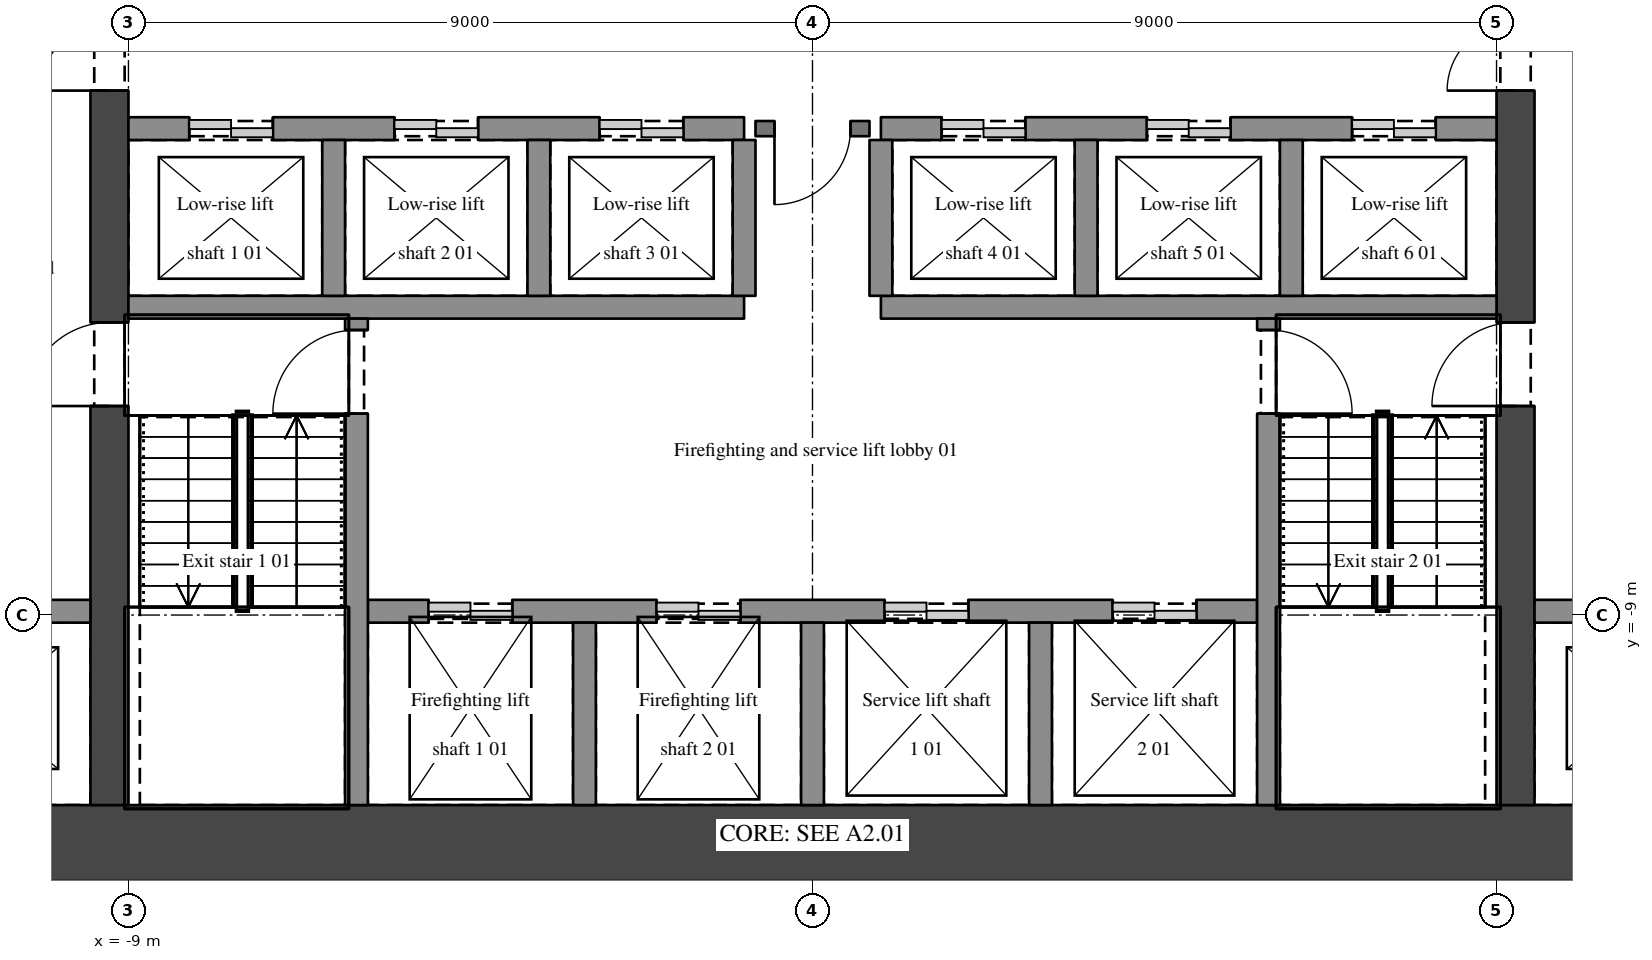
"""IFC4 building model, lengths in metres.
Left out: names, types, materials, properties, quantities, classifications, styles, units other than length and angle.
Written with IfcOpenShell. Run it as: python <this file> out.ifc"""

import sys

from ifc_helpers import new_model, si_unit, direction, frame, frame_2d, origin, place, context, subcontext, project, spatial, rectangle, extrude, element, fill, save


model = new_model("IFC4")
c1 = context("Model", 3, precision=1e-05, world=origin(), true_north=direction((0.0, 1.0)))
c2 = subcontext(c1, "Body", "Model", "MODEL_VIEW")
j1 = project(units=[si_unit("LENGTHUNIT", "METRE"), si_unit("PLANEANGLEUNIT", "RADIAN")], contexts=[c1])
p1 = place(None, origin())
s1 = spatial("IfcSite", under=j1, at=p1, CompositionType="ELEMENT")
p2 = place(p1, origin())
s2 = spatial("IfcBuilding", under=s1, at=p2, CompositionType="ELEMENT")
p3 = place(p2, origin())
s3 = spatial("IfcBuildingStorey", under=s2, at=p3, CompositionType="ELEMENT", Elevation=0.0)
p4 = place(p3, frame((-15.0, -12.0, 0.0), z_axis=(0.0, 0.0, 1.0), x_axis=(1.0, 0.0, 0.0)))
e1 = element("IfcWall", 1, at=p4, inside=s3, PredefinedType="SHEAR", context=c2, shape_type="SweptSolid", body=[
    extrude(rectangle(XDim=30.0, YDim=1.0, at=frame_2d((15.0, 0.0))), origin(), (0.0, 0.0, 1.0), 10.8),
])
p5 = place(p3, frame((-9.25, -11.5, 0.0), z_axis=(0.0, 0.0, 1.0), x_axis=(0.0, 1.0, 0.0)))
e2 = element("IfcWall", 2, at=p5, inside=s3, PredefinedType="SHEAR", context=c2, shape_type="SweptSolid", body=[
    extrude(rectangle(XDim=11.65, YDim=0.5, at=frame_2d((5.825, 0.0))), origin(), (0.0, 0.0, 1.0), 10.8),
])
p6 = place(p5, frame((9.4, 0.0, 0.0)))
e3 = element("IfcOpeningElement", 3, at=p6, cuts=e2, PredefinedType="OPENING", context=c2, shape_type="SweptSolid", body=[
    extrude(rectangle(XDim=1.8, YDim=2.1, at=frame_2d((0.9, 1.05))), frame((0.0, 0.26, 0.0), z_axis=(0.0, -1.0, 0.0), x_axis=(1.0, 0.0, 0.0)), (0.0, 0.0, 1.0), 0.52),
])
p7 = place(p5, frame((5.25, 0.0, 0.0)))
e4 = element("IfcOpeningElement", 4, at=p7, cuts=e2, PredefinedType="OPENING", context=c2, shape_type="SweptSolid", body=[
    extrude(rectangle(XDim=1.1, YDim=2.1, at=frame_2d((0.55, 1.05))), frame((0.0, 0.26, 0.0), z_axis=(0.0, -1.0, 0.0), x_axis=(1.0, 0.0, 0.0)), (0.0, 0.0, 1.0), 0.52),
])
p8 = place(p3, frame((9.25, -11.5, 0.0), z_axis=(0.0, 0.0, 1.0), x_axis=(0.0, 1.0, 0.0)))
e5 = element("IfcWall", 5, at=p8, inside=s3, PredefinedType="SHEAR", context=c2, shape_type="SweptSolid", body=[
    extrude(rectangle(XDim=11.65, YDim=0.5, at=frame_2d((5.825, 0.0))), origin(), (0.0, 0.0, 1.0), 10.8),
])
p9 = place(p8, frame((9.4, 0.0, 0.0)))
e6 = element("IfcOpeningElement", 6, at=p9, cuts=e5, PredefinedType="OPENING", context=c2, shape_type="SweptSolid", body=[
    extrude(rectangle(XDim=1.8, YDim=2.1, at=frame_2d((0.9, 1.05))), frame((0.0, 0.26, 0.0), z_axis=(0.0, -1.0, 0.0), x_axis=(1.0, 0.0, 0.0)), (0.0, 0.0, 1.0), 0.52),
])
p10 = place(p8, frame((5.25, 0.0, 0.0)))
e7 = element("IfcOpeningElement", 7, at=p10, cuts=e5, PredefinedType="OPENING", context=c2, shape_type="SweptSolid", body=[
    extrude(rectangle(XDim=1.1, YDim=2.1, at=frame_2d((0.55, 1.05))), frame((0.0, 0.26, 0.0), z_axis=(0.0, -1.0, 0.0), x_axis=(1.0, 0.0, 0.0)), (0.0, 0.0, 1.0), 0.52),
])
p11 = place(p3, frame((-12.25, -8.95, 0.0), z_axis=(0.0, 0.0, 1.0), x_axis=(1.0, 0.0, 0.0)))
e8 = element("IfcWall", 8, at=p11, inside=s3, PredefinedType="SHEAR", context=c2, shape_type="SweptSolid", body=[
    extrude(rectangle(XDim=2.75, YDim=0.3, at=frame_2d((1.375, 0.0))), origin(), (0.0, 0.0, 1.0), 10.8),
])
p12 = place(p11, frame((0.825, 0.0, 0.0)))
e9 = element("IfcOpeningElement", 9, at=p12, cuts=e8, PredefinedType="OPENING", context=c2, shape_type="SweptSolid", body=[
    extrude(rectangle(XDim=1.1, YDim=2.1, at=frame_2d((0.55, 1.05))), frame((0.0, 0.16, 0.0), z_axis=(0.0, -1.0, 0.0), x_axis=(1.0, 0.0, 0.0)), (0.0, 0.0, 1.0), 0.32),
])
p13 = place(p3, frame((-5.85, -8.95, 0.0), z_axis=(0.0, 0.0, 1.0), x_axis=(1.0, 0.0, 0.0)))
e10 = element("IfcWall", 10, at=p13, inside=s3, PredefinedType="SHEAR", context=c2, shape_type="SweptSolid", body=[
    extrude(rectangle(XDim=11.7, YDim=0.3, at=frame_2d((5.85, 0.0))), origin(), (0.0, 0.0, 1.0), 10.8),
])
p14 = place(p13, frame((0.8, 0.0, 0.0)))
e11 = element("IfcOpeningElement", 11, at=p14, cuts=e10, PredefinedType="OPENING", context=c2, shape_type="SweptSolid", body=[
    extrude(rectangle(XDim=1.1, YDim=2.1, at=frame_2d((0.55, 1.05))), frame((0.0, 0.16, 0.0), z_axis=(0.0, -1.0, 0.0), x_axis=(1.0, 0.0, 0.0)), (0.0, 0.0, 1.0), 0.32),
])
p15 = place(p13, frame((3.8, 0.0, 0.0)))
e12 = element("IfcOpeningElement", 12, at=p15, cuts=e10, PredefinedType="OPENING", context=c2, shape_type="SweptSolid", body=[
    extrude(rectangle(XDim=1.1, YDim=2.1, at=frame_2d((0.55, 1.05))), frame((0.0, 0.16, 0.0), z_axis=(0.0, -1.0, 0.0), x_axis=(1.0, 0.0, 0.0)), (0.0, 0.0, 1.0), 0.32),
])
p16 = place(p13, frame((6.8, 0.0, 0.0)))
e13 = element("IfcOpeningElement", 13, at=p16, cuts=e10, PredefinedType="OPENING", context=c2, shape_type="SweptSolid", body=[
    extrude(rectangle(XDim=1.1, YDim=2.1, at=frame_2d((0.55, 1.05))), frame((0.0, 0.16, 0.0), z_axis=(0.0, -1.0, 0.0), x_axis=(1.0, 0.0, 0.0)), (0.0, 0.0, 1.0), 0.32),
])
p17 = place(p13, frame((9.8, 0.0, 0.0)))
e14 = element("IfcOpeningElement", 14, at=p17, cuts=e10, PredefinedType="OPENING", context=c2, shape_type="SweptSolid", body=[
    extrude(rectangle(XDim=1.1, YDim=2.1, at=frame_2d((0.55, 1.05))), frame((0.0, 0.16, 0.0), z_axis=(0.0, -1.0, 0.0), x_axis=(1.0, 0.0, 0.0)), (0.0, 0.0, 1.0), 0.32),
])
p18 = place(p3, frame((9.5, -8.95, 0.0), z_axis=(0.0, 0.0, 1.0), x_axis=(1.0, 0.0, 0.0)))
e15 = element("IfcWall", 15, at=p18, inside=s3, PredefinedType="SHEAR", context=c2, shape_type="SweptSolid", body=[
    extrude(rectangle(XDim=2.75, YDim=0.3, at=frame_2d((1.375, 0.0))), origin(), (0.0, 0.0, 1.0), 10.8),
])
p19 = place(p18, frame((0.825, 0.0, 0.0)))
e16 = element("IfcOpeningElement", 16, at=p19, cuts=e15, PredefinedType="OPENING", context=c2, shape_type="SweptSolid", body=[
    extrude(rectangle(XDim=1.1, YDim=2.1, at=frame_2d((0.55, 1.05))), frame((0.0, 0.16, 0.0), z_axis=(0.0, -1.0, 0.0), x_axis=(1.0, 0.0, 0.0)), (0.0, 0.0, 1.0), 0.32),
])
for number, where, z_axis, x_axis in (
    (17, (-9.0, -4.95, 0.0), (0.0, 0.0, 1.0), (1.0, 0.0, 0.0)),
    (18, (0.9, -4.95, 0.0), (0.0, 0.0, 1.0), (1.0, 0.0, 0.0)),
):
    element("IfcWall", number, at=place(p3, frame(where, z_axis=z_axis, x_axis=x_axis)), inside=s3, PredefinedType="SHEAR", context=c2, shape_type="SweptSolid", body=[
        extrude(rectangle(XDim=8.1, YDim=0.3, at=frame_2d((4.05, 0.0))), origin(), (0.0, 0.0, 1.0), 10.8),
    ])
p20 = place(p3, frame((-9.0, -2.6, 0.0), z_axis=(0.0, 0.0, 1.0), x_axis=(1.0, 0.0, 0.0)))
e19 = element("IfcWall", 19, at=p20, inside=s3, PredefinedType="SHEAR", context=c2, shape_type="SweptSolid", body=[
    extrude(rectangle(XDim=8.1, YDim=0.3, at=frame_2d((4.05, 0.0))), origin(), (0.0, 0.0, 1.0), 10.8),
])
p21 = place(p20, frame((0.8, 0.0, 0.0)))
e20 = element("IfcOpeningElement", 20, at=p21, cuts=e19, PredefinedType="OPENING", context=c2, shape_type="SweptSolid", body=[
    extrude(rectangle(XDim=1.1, YDim=2.1, at=frame_2d((0.55, 1.05))), frame((0.0, 0.16, 0.0), z_axis=(0.0, -1.0, 0.0), x_axis=(1.0, 0.0, 0.0)), (0.0, 0.0, 1.0), 0.32),
])
p22 = place(p20, frame((3.5, 0.0, 0.0)))
e21 = element("IfcOpeningElement", 21, at=p22, cuts=e19, PredefinedType="OPENING", context=c2, shape_type="SweptSolid", body=[
    extrude(rectangle(XDim=1.1, YDim=2.1, at=frame_2d((0.55, 1.05))), frame((0.0, 0.16, 0.0), z_axis=(0.0, -1.0, 0.0), x_axis=(1.0, 0.0, 0.0)), (0.0, 0.0, 1.0), 0.32),
])
p23 = place(p20, frame((6.2, 0.0, 0.0)))
e22 = element("IfcOpeningElement", 22, at=p23, cuts=e19, PredefinedType="OPENING", context=c2, shape_type="SweptSolid", body=[
    extrude(rectangle(XDim=1.1, YDim=2.1, at=frame_2d((0.55, 1.05))), frame((0.0, 0.16, 0.0), z_axis=(0.0, -1.0, 0.0), x_axis=(1.0, 0.0, 0.0)), (0.0, 0.0, 1.0), 0.32),
])
p24 = place(p3, frame((0.75, -2.6, 0.0), z_axis=(0.0, 0.0, 1.0), x_axis=(-1.0, 0.0, 0.0)))
e23 = element("IfcWall", 23, at=p24, inside=s3, PredefinedType="SOLIDWALL", context=c2, shape_type="SweptSolid", body=[
    extrude(rectangle(XDim=1.5, YDim=0.2, at=frame_2d((0.75, 0.0))), origin(), (0.0, 0.0, 1.0), 10.5),
])
p25 = place(p24, frame((0.25, 0.0, 0.0)))
e24 = element("IfcOpeningElement", 24, at=p25, cuts=e23, PredefinedType="OPENING", context=c2, shape_type="SweptSolid", body=[
    extrude(rectangle(XDim=1.0, YDim=2.1, at=frame_2d((0.5, 1.05))), frame((0.0, 0.11, 0.0), z_axis=(0.0, -1.0, 0.0), x_axis=(1.0, 0.0, 0.0)), (0.0, 0.0, 1.0), 0.22),
])
p26 = place(p3, frame((0.9, -2.6, 0.0), z_axis=(0.0, 0.0, 1.0), x_axis=(1.0, 0.0, 0.0)))
e25 = element("IfcWall", 25, at=p26, inside=s3, PredefinedType="SHEAR", context=c2, shape_type="SweptSolid", body=[
    extrude(rectangle(XDim=8.1, YDim=0.3, at=frame_2d((4.05, 0.0))), origin(), (0.0, 0.0, 1.0), 10.8),
])
p27 = place(p26, frame((0.8, 0.0, 0.0)))
e26 = element("IfcOpeningElement", 26, at=p27, cuts=e25, PredefinedType="OPENING", context=c2, shape_type="SweptSolid", body=[
    extrude(rectangle(XDim=1.1, YDim=2.1, at=frame_2d((0.55, 1.05))), frame((0.0, 0.16, 0.0), z_axis=(0.0, -1.0, 0.0), x_axis=(1.0, 0.0, 0.0)), (0.0, 0.0, 1.0), 0.32),
])
p28 = place(p26, frame((3.5, 0.0, 0.0)))
e27 = element("IfcOpeningElement", 27, at=p28, cuts=e25, PredefinedType="OPENING", context=c2, shape_type="SweptSolid", body=[
    extrude(rectangle(XDim=1.1, YDim=2.1, at=frame_2d((0.55, 1.05))), frame((0.0, 0.16, 0.0), z_axis=(0.0, -1.0, 0.0), x_axis=(1.0, 0.0, 0.0)), (0.0, 0.0, 1.0), 0.32),
])
p29 = place(p26, frame((6.2, 0.0, 0.0)))
e28 = element("IfcOpeningElement", 28, at=p29, cuts=e25, PredefinedType="OPENING", context=c2, shape_type="SweptSolid", body=[
    extrude(rectangle(XDim=1.1, YDim=2.1, at=frame_2d((0.55, 1.05))), frame((0.0, 0.16, 0.0), z_axis=(0.0, -1.0, 0.0), x_axis=(1.0, 0.0, 0.0)), (0.0, 0.0, 1.0), 0.32),
])
p30 = place(p3, frame((-6.3, -4.8, 0.0), z_axis=(0.0, 0.0, 1.0), x_axis=(0.0, 1.0, 0.0)))
e29 = element("IfcWall", 29, at=p30, inside=s3, PredefinedType="SHEAR", context=c2, shape_type="SweptSolid", body=[
    extrude(rectangle(XDim=2.05, YDim=0.3, at=frame_2d((1.025, 0.0))), origin(), (0.0, 0.0, 1.0), 10.8),
])
p31 = place(p3, frame((-6.0, -11.5, 0.0), z_axis=(0.0, 0.0, 1.0), x_axis=(0.0, 1.0, 0.0)))
e30 = element("IfcWall", 30, at=p31, inside=s3, PredefinedType="SHEAR", context=c2, shape_type="SweptSolid", body=[
    extrude(rectangle(XDim=6.4, YDim=0.3, at=frame_2d((3.2, 0.0))), origin(), (0.0, 0.0, 1.0), 10.8),
])
p32 = place(p31, frame((5.15, 0.0, 0.0)))
e31 = element("IfcOpeningElement", 31, at=p32, cuts=e30, PredefinedType="OPENING", context=c2, shape_type="SweptSolid", body=[
    extrude(rectangle(XDim=1.1, YDim=2.1, at=frame_2d((0.55, 1.05))), frame((0.0, 0.16, 0.0), z_axis=(0.0, -1.0, 0.0), x_axis=(1.0, 0.0, 0.0)), (0.0, 0.0, 1.0), 0.32),
])
p33 = place(p3, frame((-3.6, -4.8, 0.0), z_axis=(0.0, 0.0, 1.0), x_axis=(0.0, 1.0, 0.0)))
e32 = element("IfcWall", 32, at=p33, inside=s3, PredefinedType="SHEAR", context=c2, shape_type="SweptSolid", body=[
    extrude(rectangle(XDim=2.05, YDim=0.3, at=frame_2d((1.025, 0.0))), origin(), (0.0, 0.0, 1.0), 10.8),
])
p34 = place(p3, frame((-3.0, -11.5, 0.0), z_axis=(0.0, 0.0, 1.0), x_axis=(0.0, 1.0, 0.0)))
e33 = element("IfcWall", 33, at=p34, inside=s3, PredefinedType="SHEAR", context=c2, shape_type="SweptSolid", body=[
    extrude(rectangle(XDim=2.4, YDim=0.3, at=frame_2d((1.2, 0.0))), origin(), (0.0, 0.0, 1.0), 10.8),
])
p35 = place(p3, frame((-0.9, -4.8, 0.0), z_axis=(0.0, 0.0, 1.0), x_axis=(0.0, 1.0, 0.0)))
e34 = element("IfcWall", 34, at=p35, inside=s3, PredefinedType="SHEAR", context=c2, shape_type="SweptSolid", body=[
    extrude(rectangle(XDim=2.05, YDim=0.3, at=frame_2d((1.025, 0.0))), origin(), (0.0, 0.0, 1.0), 10.8),
])
p36 = place(p3, frame((0.0, -11.5, 0.0), z_axis=(0.0, 0.0, 1.0), x_axis=(0.0, 1.0, 0.0)))
e35 = element("IfcWall", 35, at=p36, inside=s3, PredefinedType="SHEAR", context=c2, shape_type="SweptSolid", body=[
    extrude(rectangle(XDim=2.4, YDim=0.3, at=frame_2d((1.2, 0.0))), origin(), (0.0, 0.0, 1.0), 10.8),
])
p37 = place(p3, frame((0.9, -4.8, 0.0), z_axis=(0.0, 0.0, 1.0), x_axis=(0.0, 1.0, 0.0)))
e36 = element("IfcWall", 36, at=p37, inside=s3, PredefinedType="SHEAR", context=c2, shape_type="SweptSolid", body=[
    extrude(rectangle(XDim=2.05, YDim=0.3, at=frame_2d((1.025, 0.0))), origin(), (0.0, 0.0, 1.0), 10.8),
])
p38 = place(p3, frame((3.0, -11.5, 0.0), z_axis=(0.0, 0.0, 1.0), x_axis=(0.0, 1.0, 0.0)))
e37 = element("IfcWall", 37, at=p38, inside=s3, PredefinedType="SHEAR", context=c2, shape_type="SweptSolid", body=[
    extrude(rectangle(XDim=2.4, YDim=0.3, at=frame_2d((1.2, 0.0))), origin(), (0.0, 0.0, 1.0), 10.8),
])
p39 = place(p3, frame((3.6, -4.8, 0.0), z_axis=(0.0, 0.0, 1.0), x_axis=(0.0, 1.0, 0.0)))
e38 = element("IfcWall", 38, at=p39, inside=s3, PredefinedType="SHEAR", context=c2, shape_type="SweptSolid", body=[
    extrude(rectangle(XDim=2.05, YDim=0.3, at=frame_2d((1.025, 0.0))), origin(), (0.0, 0.0, 1.0), 10.8),
])
p40 = place(p3, frame((6.0, -5.1, 0.0), z_axis=(0.0, 0.0, 1.0), x_axis=(0.0, -1.0, 0.0)))
e39 = element("IfcWall", 39, at=p40, inside=s3, PredefinedType="SHEAR", context=c2, shape_type="SweptSolid", body=[
    extrude(rectangle(XDim=6.4, YDim=0.3, at=frame_2d((3.2, 0.0))), origin(), (0.0, 0.0, 1.0), 10.8),
])
p41 = place(p40, frame((0.15, 0.0, 0.0)))
e40 = element("IfcOpeningElement", 40, at=p41, cuts=e39, PredefinedType="OPENING", context=c2, shape_type="SweptSolid", body=[
    extrude(rectangle(XDim=1.1, YDim=2.1, at=frame_2d((0.55, 1.05))), frame((0.0, 0.16, 0.0), z_axis=(0.0, -1.0, 0.0), x_axis=(1.0, 0.0, 0.0)), (0.0, 0.0, 1.0), 0.32),
])
p42 = place(p3, frame((6.3, -4.8, 0.0), z_axis=(0.0, 0.0, 1.0), x_axis=(0.0, 1.0, 0.0)))
e41 = element("IfcWall", 41, at=p42, inside=s3, PredefinedType="SHEAR", context=c2, shape_type="SweptSolid", body=[
    extrude(rectangle(XDim=2.05, YDim=0.3, at=frame_2d((1.025, 0.0))), origin(), (0.0, 0.0, 1.0), 10.8),
])
p43 = place(p9, origin())
e42 = element("IfcDoor", 42, at=p43, inside=s3, OperationType="DOUBLE_DOOR_SINGLE_SWING", PredefinedType="DOOR", context=c2, shape_type="SweptSolid", body=[
    extrude(rectangle(XDim=1.8, YDim=2.1, at=frame_2d((0.9, 1.05))), frame((0.0, 0.025, 0.0), z_axis=(0.0, -1.0, 0.0), x_axis=(1.0, 0.0, 0.0)), (0.0, 0.0, 1.0), 0.05),
])
fill(e6, e42)
p44 = place(p6, origin())
e43 = element("IfcDoor", 43, at=p44, inside=s3, OperationType="DOUBLE_DOOR_SINGLE_SWING", PredefinedType="DOOR", context=c2, shape_type="SweptSolid", body=[
    extrude(rectangle(XDim=1.8, YDim=2.1, at=frame_2d((0.9, 1.05))), frame((0.0, 0.025, 0.0), z_axis=(0.0, -1.0, 0.0), x_axis=(1.0, 0.0, 0.0)), (0.0, 0.0, 1.0), 0.05),
])
fill(e3, e43)
p45 = place(p25, origin())
e44 = element("IfcDoor", 44, at=p45, inside=s3, OperationType="SINGLE_SWING_RIGHT", PredefinedType="DOOR", context=c2, shape_type="SweptSolid", body=[
    extrude(rectangle(XDim=1.0, YDim=2.1, at=frame_2d((0.5, 1.05))), frame((0.0, 0.025, 0.0), z_axis=(0.0, -1.0, 0.0), x_axis=(1.0, 0.0, 0.0)), (0.0, 0.0, 1.0), 0.05),
])
fill(e24, e44)
p46 = place(p32, origin())
e45 = element("IfcDoor", 45, at=p46, inside=s3, OperationType="SINGLE_SWING_LEFT", PredefinedType="DOOR", context=c2, shape_type="SweptSolid", body=[
    extrude(rectangle(XDim=1.1, YDim=2.1, at=frame_2d((0.55, 1.05))), frame((0.0, 0.025, 0.0), z_axis=(0.0, -1.0, 0.0), x_axis=(1.0, 0.0, 0.0)), (0.0, 0.0, 1.0), 0.05),
])
fill(e31, e45)
p47 = place(p7, origin())
e46 = element("IfcDoor", 46, at=p47, inside=s3, OperationType="SINGLE_SWING_LEFT", PredefinedType="DOOR", context=c2, shape_type="SweptSolid", body=[
    extrude(rectangle(XDim=1.1, YDim=2.1, at=frame_2d((0.55, 1.05))), frame((0.0, 0.025, 0.0), z_axis=(0.0, -1.0, 0.0), x_axis=(1.0, 0.0, 0.0)), (0.0, 0.0, 1.0), 0.05),
])
fill(e4, e46)
p48 = place(p41, origin())
e47 = element("IfcDoor", 47, at=p48, inside=s3, OperationType="SINGLE_SWING_RIGHT", PredefinedType="DOOR", context=c2, shape_type="SweptSolid", body=[
    extrude(rectangle(XDim=1.1, YDim=2.1, at=frame_2d((0.55, 1.05))), frame((0.0, 0.025, 0.0), z_axis=(0.0, -1.0, 0.0), x_axis=(1.0, 0.0, 0.0)), (0.0, 0.0, 1.0), 0.05),
])
fill(e40, e47)
p49 = place(p10, origin())
e48 = element("IfcDoor", 48, at=p49, inside=s3, OperationType="SINGLE_SWING_LEFT", PredefinedType="DOOR", context=c2, shape_type="SweptSolid", body=[
    extrude(rectangle(XDim=1.1, YDim=2.1, at=frame_2d((0.55, 1.05))), frame((0.0, 0.025, 0.0), z_axis=(0.0, -1.0, 0.0), x_axis=(1.0, 0.0, 0.0)), (0.0, 0.0, 1.0), 0.05),
])
fill(e7, e48)
p50 = place(p14, origin())
e49 = element("IfcDoor", 49, at=p50, inside=s3, OperationType="DOUBLE_DOOR_SLIDING", PredefinedType="DOOR", context=c2, shape_type="SweptSolid", body=[
    extrude(rectangle(XDim=1.1, YDim=2.1, at=frame_2d((0.55, 1.05))), frame((0.0, 0.025, 0.0), z_axis=(0.0, -1.0, 0.0), x_axis=(1.0, 0.0, 0.0)), (0.0, 0.0, 1.0), 0.05),
])
fill(e11, e49)
p51 = place(p15, origin())
e50 = element("IfcDoor", 50, at=p51, inside=s3, OperationType="DOUBLE_DOOR_SLIDING", PredefinedType="DOOR", context=c2, shape_type="SweptSolid", body=[
    extrude(rectangle(XDim=1.1, YDim=2.1, at=frame_2d((0.55, 1.05))), frame((0.0, 0.025, 0.0), z_axis=(0.0, -1.0, 0.0), x_axis=(1.0, 0.0, 0.0)), (0.0, 0.0, 1.0), 0.05),
])
fill(e12, e50)
p52 = place(p21, origin())
e51 = element("IfcDoor", 51, at=p52, inside=s3, OperationType="DOUBLE_DOOR_SLIDING", PredefinedType="DOOR", context=c2, shape_type="SweptSolid", body=[
    extrude(rectangle(XDim=1.1, YDim=2.1, at=frame_2d((0.55, 1.05))), frame((0.0, 0.025, 0.0), z_axis=(0.0, -1.0, 0.0), x_axis=(1.0, 0.0, 0.0)), (0.0, 0.0, 1.0), 0.05),
])
fill(e20, e51)
p53 = place(p22, origin())
e52 = element("IfcDoor", 52, at=p53, inside=s3, OperationType="DOUBLE_DOOR_SLIDING", PredefinedType="DOOR", context=c2, shape_type="SweptSolid", body=[
    extrude(rectangle(XDim=1.1, YDim=2.1, at=frame_2d((0.55, 1.05))), frame((0.0, 0.025, 0.0), z_axis=(0.0, -1.0, 0.0), x_axis=(1.0, 0.0, 0.0)), (0.0, 0.0, 1.0), 0.05),
])
fill(e21, e52)
p54 = place(p23, origin())
e53 = element("IfcDoor", 53, at=p54, inside=s3, OperationType="DOUBLE_DOOR_SLIDING", PredefinedType="DOOR", context=c2, shape_type="SweptSolid", body=[
    extrude(rectangle(XDim=1.1, YDim=2.1, at=frame_2d((0.55, 1.05))), frame((0.0, 0.025, 0.0), z_axis=(0.0, -1.0, 0.0), x_axis=(1.0, 0.0, 0.0)), (0.0, 0.0, 1.0), 0.05),
])
fill(e22, e53)
p55 = place(p27, origin())
e54 = element("IfcDoor", 54, at=p55, inside=s3, OperationType="DOUBLE_DOOR_SLIDING", PredefinedType="DOOR", context=c2, shape_type="SweptSolid", body=[
    extrude(rectangle(XDim=1.1, YDim=2.1, at=frame_2d((0.55, 1.05))), frame((0.0, 0.025, 0.0), z_axis=(0.0, -1.0, 0.0), x_axis=(1.0, 0.0, 0.0)), (0.0, 0.0, 1.0), 0.05),
])
fill(e26, e54)
p56 = place(p28, origin())
e55 = element("IfcDoor", 55, at=p56, inside=s3, OperationType="DOUBLE_DOOR_SLIDING", PredefinedType="DOOR", context=c2, shape_type="SweptSolid", body=[
    extrude(rectangle(XDim=1.1, YDim=2.1, at=frame_2d((0.55, 1.05))), frame((0.0, 0.025, 0.0), z_axis=(0.0, -1.0, 0.0), x_axis=(1.0, 0.0, 0.0)), (0.0, 0.0, 1.0), 0.05),
])
fill(e27, e55)
p57 = place(p29, origin())
e56 = element("IfcDoor", 56, at=p57, inside=s3, OperationType="DOUBLE_DOOR_SLIDING", PredefinedType="DOOR", context=c2, shape_type="SweptSolid", body=[
    extrude(rectangle(XDim=1.1, YDim=2.1, at=frame_2d((0.55, 1.05))), frame((0.0, 0.025, 0.0), z_axis=(0.0, -1.0, 0.0), x_axis=(1.0, 0.0, 0.0)), (0.0, 0.0, 1.0), 0.05),
])
fill(e28, e56)
p58 = place(p16, origin())
e57 = element("IfcDoor", 57, at=p58, inside=s3, OperationType="DOUBLE_DOOR_SLIDING", PredefinedType="DOOR", context=c2, shape_type="SweptSolid", body=[
    extrude(rectangle(XDim=1.1, YDim=2.1, at=frame_2d((0.55, 1.05))), frame((0.0, 0.025, 0.0), z_axis=(0.0, -1.0, 0.0), x_axis=(1.0, 0.0, 0.0)), (0.0, 0.0, 1.0), 0.05),
])
fill(e13, e57)
p59 = place(p17, origin())
e58 = element("IfcDoor", 58, at=p59, inside=s3, OperationType="DOUBLE_DOOR_SLIDING", PredefinedType="DOOR", context=c2, shape_type="SweptSolid", body=[
    extrude(rectangle(XDim=1.1, YDim=2.1, at=frame_2d((0.55, 1.05))), frame((0.0, 0.025, 0.0), z_axis=(0.0, -1.0, 0.0), x_axis=(1.0, 0.0, 0.0)), (0.0, 0.0, 1.0), 0.05),
])
fill(e14, e58)
save(model, sys.argv[1])
